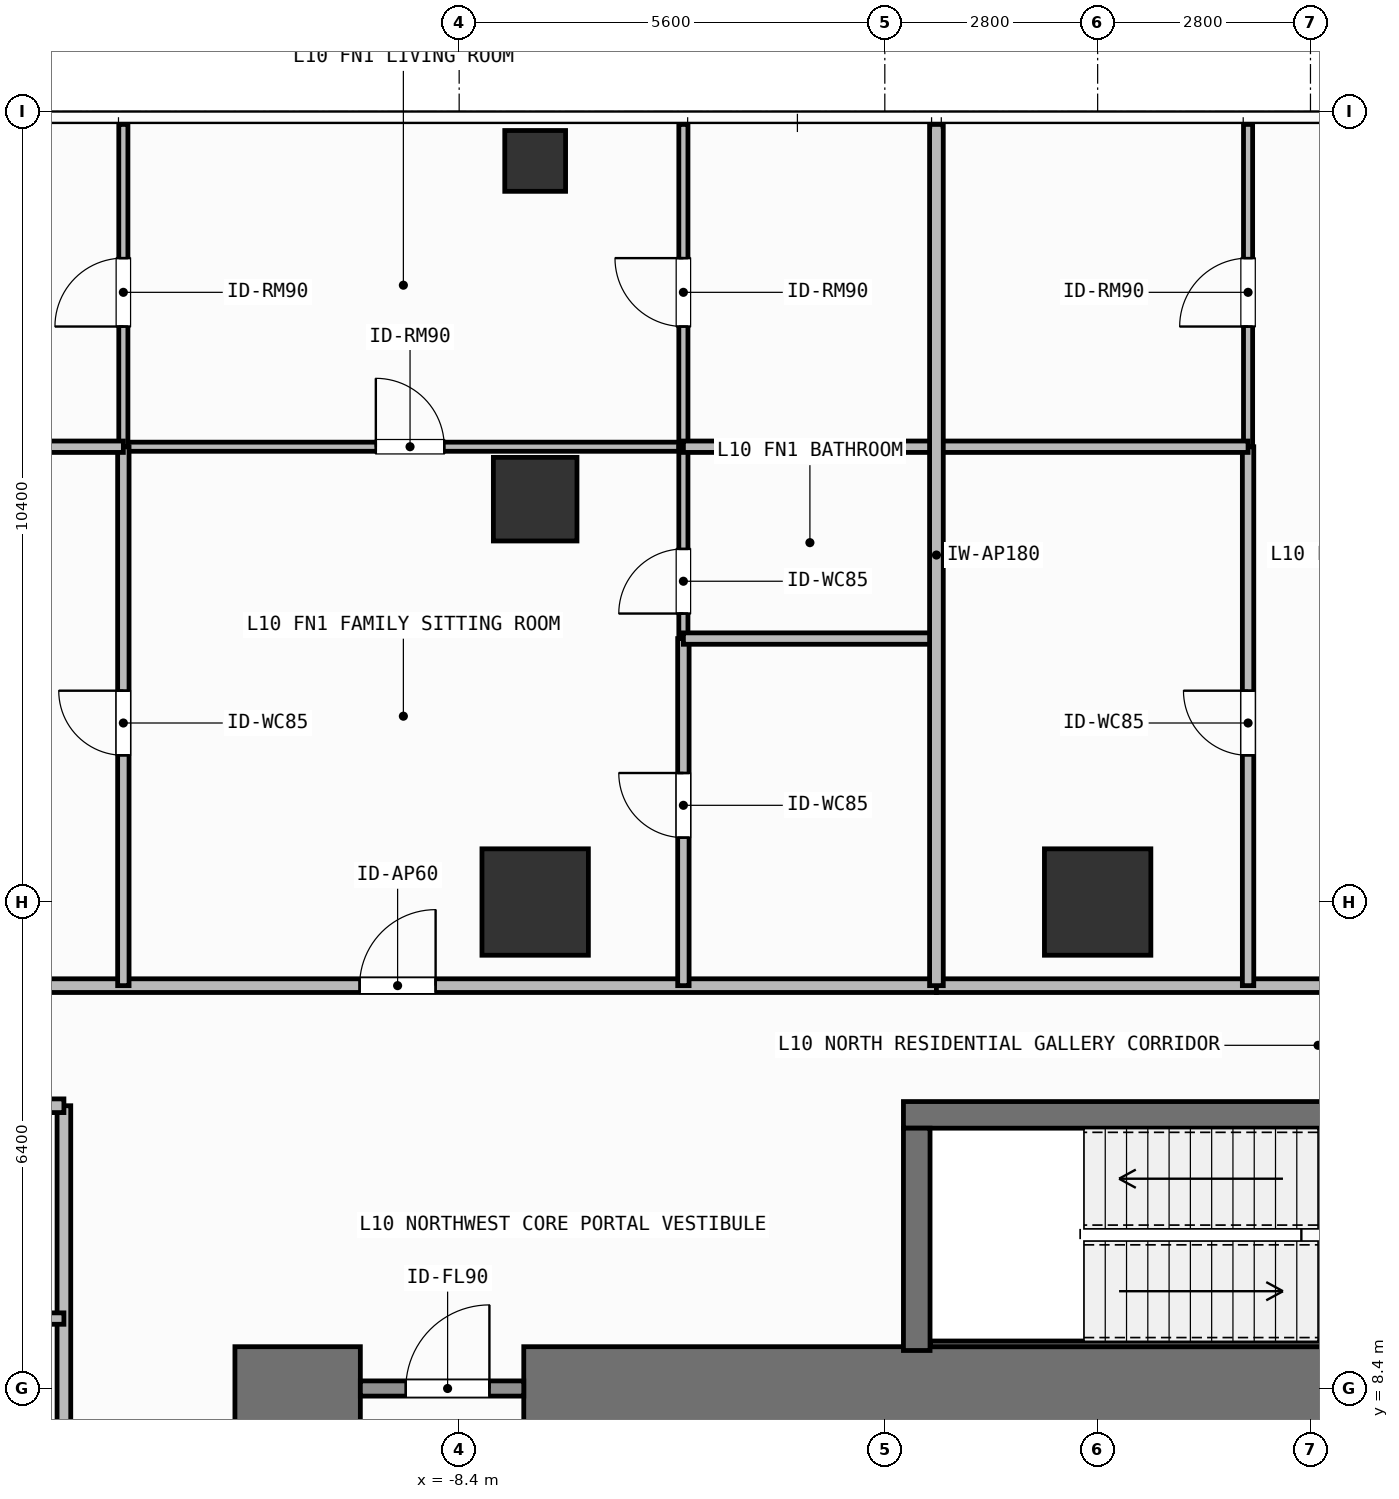
"""IFC4 building model, lengths in metres.
Left out: names, types, materials, properties, quantities, classifications, styles, units other than length and angle.
Written with IfcOpenShell. Run it as: python <this file> out.ifc"""

import sys

from ifc_helpers import new_model, si_unit, direction, frame, frame_2d, origin, origin_2d, place, context, subcontext, project, spatial, rectangle, hollow_rectangle, extrude, element, fill, save


model = new_model("IFC4")
c1 = context("Model", 3, precision=1e-05, world=origin(), true_north=direction((0.0, 1.0)))
c2 = subcontext(c1, "Body", "Model", "MODEL_VIEW")
j1 = project(units=[si_unit("LENGTHUNIT", "METRE"), si_unit("PLANEANGLEUNIT", "RADIAN")], contexts=[c1])
p1 = place(None, origin())
s1 = spatial("IfcSite", under=j1, at=p1, CompositionType="ELEMENT")
p2 = place(p1, origin())
s2 = spatial("IfcBuilding", under=s1, at=p2, CompositionType="ELEMENT")
p3 = place(p2, frame((0.0, 0.0, 38.4)))
s3 = spatial("IfcBuildingStorey", under=s2, at=p3, CompositionType="ELEMENT", Elevation=38.4)
p4 = place(p3, frame((-11.35, 8.4, 0.0), z_axis=(0.0, 0.0, 1.0), x_axis=(1.0, 0.0, 0.0)))
e1 = element("IfcWall", 1, at=p4, inside=s3, PredefinedType="SHEAR", context=c2, shape_type="SweptSolid", body=[
    extrude(rectangle(XDim=1.65, YDim=1.1, at=frame_2d((0.825, 0.0))), origin(), (0.0, 0.0, 1.0), 3.9),
])
p5 = place(p3, frame((-7.55, 8.4, 0.0), z_axis=(0.0, 0.0, 1.0), x_axis=(1.0, 0.0, 0.0)))
e2 = element("IfcWall", 2, at=p5, inside=s3, PredefinedType="SHEAR", context=c2, shape_type="SweptSolid", body=[
    extrude(rectangle(XDim=16.5, YDim=1.1, at=frame_2d((8.25, 0.0))), origin(), (0.0, 0.0, 1.0), 3.9),
])
p6 = place(p3, frame((-2.555, 12.0, 0.0), z_axis=(0.0, 0.0, 1.0), x_axis=(1.0, 0.0, 0.0)))
e3 = element("IfcWall", 3, at=p6, inside=s3, PredefinedType="SHEAR", context=c2, shape_type="SweptSolid", body=[
    extrude(rectangle(XDim=7.31, YDim=0.35, at=frame_2d((3.655, 0.0))), origin(), (0.0, 0.0, 1.0), 3.9),
])
p7 = place(p3, frame((-2.2, 8.988, 0.0), z_axis=(0.0, 0.0, 1.0), x_axis=(1.0, 0.0, 0.0)))
e4 = element("IfcWall", 4, at=p7, inside=s3, PredefinedType="SHEAR", context=c2, shape_type="SweptSolid", body=[
    extrude(rectangle(XDim=6.6, YDim=0.075, at=frame_2d((3.3, 0.0))), origin(), (0.0, 0.0, 1.0), 3.9),
])
p8 = place(p3, frame((-2.38, 8.9, 0.0), z_axis=(0.0, 0.0, 1.0), x_axis=(0.0, 1.0, 0.0)))
e5 = element("IfcWall", 5, at=p8, inside=s3, PredefinedType="SHEAR", context=c2, shape_type="SweptSolid", body=[
    extrude(rectangle(XDim=2.925, YDim=0.35, at=frame_2d((1.462, 0.0))), origin(), (0.0, 0.0, 1.0), 3.9),
])
for number, where, z_axis, x_axis in (
    (6, (-7.4, 14.8, 0.0), (0.0, 0.0, 1.0), (1.0, 0.0, 0.0)),
    (7, (0.0, 14.8, 0.0), (0.0, 0.0, 1.0), (1.0, 0.0, 0.0)),
):
    element("IfcColumn", number, at=place(p3, frame(where, z_axis=z_axis, x_axis=x_axis)), inside=s3, PredefinedType="COLUMN", context=c2, shape_type="SweptSolid", body=[
        extrude(rectangle(XDim=1.4, YDim=1.4, at=origin_2d()), origin(), (0.0, 0.0, 1.0), 3.9),
    ])
p9 = place(p3, frame((-7.4, 20.1, 0.0), z_axis=(0.0, 0.0, 1.0), x_axis=(1.0, 0.0, 0.0)))
e8 = element("IfcColumn", 8, at=p9, inside=s3, PredefinedType="COLUMN", context=c2, shape_type="SweptSolid", body=[
    extrude(rectangle(XDim=1.1, YDim=1.1, at=origin_2d()), origin(), (0.0, 0.0, 1.0), 3.9),
])
p10 = place(p3, frame((-7.4, 24.55, 0.0), z_axis=(0.0, 0.0, 1.0), x_axis=(1.0, 0.0, 0.0)))
e9 = element("IfcColumn", 9, at=p10, inside=s3, PredefinedType="COLUMN", context=c2, shape_type="SweptSolid", body=[
    extrude(hollow_rectangle(XDim=0.8, YDim=0.8, WallThickness=0.036, at=origin_2d()), origin(), (0.0, 0.0, 1.0), 3.9),
])
p11 = place(p3, frame((-9.7, 8.4, 0.0), z_axis=(0.0, 0.0, 1.0), x_axis=(1.0, 0.0, 0.0)))
e10 = element("IfcWall", 10, at=p11, inside=s3, PredefinedType="SOLIDWALL", context=c2, shape_type="SweptSolid", body=[
    extrude(rectangle(XDim=2.15, YDim=0.2, at=frame_2d((1.075, 0.0))), origin(), (0.0, 0.0, 1.0), 2.72),
])
p12 = place(p11, frame((0.598, 0.0, 0.0)))
e11 = element("IfcOpeningElement", 11, at=p12, cuts=e10, PredefinedType="OPENING", context=c2, shape_type="SweptSolid", body=[
    extrude(rectangle(XDim=1.1, YDim=2.15, at=frame_2d((0.55, 1.075))), frame((0.0, 0.11, 0.0), z_axis=(0.0, -1.0, 0.0), x_axis=(1.0, 0.0, 0.0)), (0.0, 0.0, 1.0), 0.22),
])
p13 = place(p3, frame((-18.62, 13.7, 0.0), z_axis=(0.0, 0.0, 1.0), x_axis=(1.0, 0.0, 0.0)))
e12 = element("IfcWall", 12, at=p13, inside=s3, PredefinedType="PARTITIONING", context=c2, shape_type="SweptSolid", body=[
    extrude(rectangle(XDim=16.499, YDim=0.18, at=frame_2d((8.25, 0.0))), origin(), (0.0, 0.0, 1.0), 3.68),
])
p14 = place(p13, frame((8.91, 0.0, 0.0)))
e13 = element("IfcOpeningElement", 13, at=p14, cuts=e12, PredefinedType="OPENING", context=c2, shape_type="SweptSolid", body=[
    extrude(rectangle(XDim=1.0, YDim=2.2, at=frame_2d((0.5, 1.1))), frame((0.0, 0.1, 0.0), z_axis=(0.0, -1.0, 0.0), x_axis=(1.0, 0.0, 0.0)), (0.0, 0.0, 1.0), 0.2),
])
p15 = place(p3, frame((-12.818, 20.79, 0.0), z_axis=(0.0, 0.0, 1.0), x_axis=(1.0, 0.0, 0.0)))
e14 = element("IfcWall", 14, at=p15, inside=s3, PredefinedType="PARTITIONING", context=c2, shape_type="SweptSolid", body=[
    extrude(rectangle(XDim=7.368, YDim=0.12, at=frame_2d((3.684, 0.0))), origin(), (0.0, 0.0, 1.0), 3.68),
])
p16 = place(p15, frame((3.322, 0.0, 0.0)))
e15 = element("IfcOpeningElement", 15, at=p16, cuts=e14, PredefinedType="OPENING", context=c2, shape_type="SweptSolid", body=[
    extrude(rectangle(XDim=0.9, YDim=2.1, at=frame_2d((0.45, 1.05))), frame((0.0, 0.07, 0.0), z_axis=(0.0, -1.0, 0.0), x_axis=(1.0, 0.0, 0.0)), (0.0, 0.0, 1.0), 0.14),
])
p17 = place(p3, frame((-12.818, 13.7, 0.0), z_axis=(0.0, 0.0, 1.0), x_axis=(0.0, 1.0, 0.0)))
e16 = element("IfcWall", 16, at=p17, inside=s3, PredefinedType="PARTITIONING", context=c2, shape_type="SweptSolid", body=[
    extrude(rectangle(XDim=7.09, YDim=0.15, at=frame_2d((3.545, 0.0))), origin(), (0.0, 0.0, 1.0), 3.68),
])
p18 = place(p17, frame((3.03, 0.0, 0.0)))
e17 = element("IfcOpeningElement", 17, at=p18, cuts=e16, PredefinedType="OPENING", context=c2, shape_type="SweptSolid", body=[
    extrude(rectangle(XDim=0.85, YDim=2.1, at=frame_2d((0.425, 1.05))), frame((0.0, 0.085, 0.0), z_axis=(0.0, -1.0, 0.0), x_axis=(1.0, 0.0, 0.0)), (0.0, 0.0, 1.0), 0.17),
])
p19 = place(p3, frame((-12.818, 20.79, 0.0), z_axis=(0.0, 0.0, 1.0), x_axis=(0.0, 1.0, 0.0)))
e18 = element("IfcWall", 18, at=p19, inside=s3, PredefinedType="PARTITIONING", context=c2, shape_type="SweptSolid", body=[
    extrude(rectangle(XDim=4.24, YDim=0.12, at=frame_2d((2.12, 0.0))), origin(), (0.0, 0.0, 1.0), 3.68),
])
p20 = place(p19, frame((1.581, 0.0, 0.0)))
e19 = element("IfcOpeningElement", 19, at=p20, cuts=e18, PredefinedType="OPENING", context=c2, shape_type="SweptSolid", body=[
    extrude(rectangle(XDim=0.9, YDim=2.1, at=frame_2d((0.45, 1.05))), frame((0.0, 0.07, 0.0), z_axis=(0.0, -1.0, 0.0), x_axis=(1.0, 0.0, 0.0)), (0.0, 0.0, 1.0), 0.14),
])
p21 = place(p3, frame((-5.45, 13.7, 0.0), z_axis=(0.0, 0.0, 1.0), x_axis=(0.0, 1.0, 0.0)))
e20 = element("IfcWall", 20, at=p21, inside=s3, PredefinedType="PARTITIONING", context=c2, shape_type="SweptSolid", body=[
    extrude(rectangle(XDim=4.566, YDim=0.15, at=frame_2d((2.283, 0.0))), origin(), (0.0, 0.0, 1.0), 3.68),
])
p22 = place(p21, frame((1.948, 0.0, 0.0)))
e21 = element("IfcOpeningElement", 21, at=p22, cuts=e20, PredefinedType="OPENING", context=c2, shape_type="SweptSolid", body=[
    extrude(rectangle(XDim=0.85, YDim=2.1, at=frame_2d((0.425, 1.05))), frame((0.0, 0.085, 0.0), z_axis=(0.0, -1.0, 0.0), x_axis=(1.0, 0.0, 0.0)), (0.0, 0.0, 1.0), 0.17),
])
p23 = place(p3, frame((-5.45, 18.266, 0.0), z_axis=(0.0, 0.0, 1.0), x_axis=(0.0, 1.0, 0.0)))
e22 = element("IfcWall", 22, at=p23, inside=s3, PredefinedType="PARTITIONING", context=c2, shape_type="SweptSolid", body=[
    extrude(rectangle(XDim=2.524, YDim=0.12, at=frame_2d((1.262, 0.0))), origin(), (0.0, 0.0, 1.0), 3.68),
])
p24 = place(p23, frame((0.329, 0.0, 0.0)))
e23 = element("IfcOpeningElement", 23, at=p24, cuts=e22, PredefinedType="OPENING", context=c2, shape_type="SweptSolid", body=[
    extrude(rectangle(XDim=0.85, YDim=2.1, at=frame_2d((0.425, 1.05))), frame((0.0, 0.07, 0.0), z_axis=(0.0, -1.0, 0.0), x_axis=(1.0, 0.0, 0.0)), (0.0, 0.0, 1.0), 0.14),
])
p25 = place(p3, frame((-5.45, 20.79, 0.0), z_axis=(0.0, 0.0, 1.0), x_axis=(0.0, 1.0, 0.0)))
e24 = element("IfcWall", 24, at=p25, inside=s3, PredefinedType="PARTITIONING", context=c2, shape_type="SweptSolid", body=[
    extrude(rectangle(XDim=4.24, YDim=0.12, at=frame_2d((2.12, 0.0))), origin(), (0.0, 0.0, 1.0), 3.68),
])
p26 = place(p25, frame((1.581, 0.0, 0.0)))
e25 = element("IfcOpeningElement", 25, at=p26, cuts=e24, PredefinedType="OPENING", context=c2, shape_type="SweptSolid", body=[
    extrude(rectangle(XDim=0.9, YDim=2.1, at=frame_2d((0.45, 1.05))), frame((0.0, 0.07, 0.0), z_axis=(0.0, -1.0, 0.0), x_axis=(1.0, 0.0, 0.0)), (0.0, 0.0, 1.0), 0.14),
])
p27 = place(p3, frame((-2.121, 13.7, 0.0), z_axis=(0.0, 0.0, 1.0), x_axis=(1.0, 0.0, 0.0)))
e26 = element("IfcWall", 26, at=p27, inside=s3, PredefinedType="PARTITIONING", context=c2, shape_type="SweptSolid", body=[
    extrude(rectangle(XDim=11.226, YDim=0.18, at=frame_2d((5.613, 0.0))), origin(), (0.0, 0.0, 1.0), 3.68),
])
p28 = place(p27, frame((5.29, 0.0, 0.0)))
e27 = element("IfcOpeningElement", 27, at=p28, cuts=e26, PredefinedType="OPENING", context=c2, shape_type="SweptSolid", body=[
    extrude(rectangle(XDim=1.0, YDim=2.2, at=frame_2d((0.5, 1.1))), frame((0.0, 0.1, 0.0), z_axis=(0.0, -1.0, 0.0), x_axis=(1.0, 0.0, 0.0)), (0.0, 0.0, 1.0), 0.2),
])
p29 = place(p3, frame((1.979, 13.7, 0.0), z_axis=(0.0, 0.0, 1.0), x_axis=(0.0, 1.0, 0.0)))
e28 = element("IfcWall", 28, at=p29, inside=s3, PredefinedType="PARTITIONING", context=c2, shape_type="SweptSolid", body=[
    extrude(rectangle(XDim=7.09, YDim=0.15, at=frame_2d((3.545, 0.0))), origin(), (0.0, 0.0, 1.0), 3.68),
])
p30 = place(p29, frame((3.03, 0.0, 0.0)))
e29 = element("IfcOpeningElement", 29, at=p30, cuts=e28, PredefinedType="OPENING", context=c2, shape_type="SweptSolid", body=[
    extrude(rectangle(XDim=0.85, YDim=2.1, at=frame_2d((0.425, 1.05))), frame((0.0, 0.085, 0.0), z_axis=(0.0, -1.0, 0.0), x_axis=(1.0, 0.0, 0.0)), (0.0, 0.0, 1.0), 0.17),
])
p31 = place(p3, frame((1.979, 20.79, 0.0), z_axis=(0.0, 0.0, 1.0), x_axis=(0.0, 1.0, 0.0)))
e30 = element("IfcWall", 30, at=p31, inside=s3, PredefinedType="PARTITIONING", context=c2, shape_type="SweptSolid", body=[
    extrude(rectangle(XDim=4.24, YDim=0.12, at=frame_2d((2.12, 0.0))), origin(), (0.0, 0.0, 1.0), 3.68),
])
p32 = place(p31, frame((1.581, 0.0, 0.0)))
e31 = element("IfcOpeningElement", 31, at=p32, cuts=e30, PredefinedType="OPENING", context=c2, shape_type="SweptSolid", body=[
    extrude(rectangle(XDim=0.9, YDim=2.1, at=frame_2d((0.45, 1.05))), frame((0.0, 0.07, 0.0), z_axis=(0.0, -1.0, 0.0), x_axis=(1.0, 0.0, 0.0)), (0.0, 0.0, 1.0), 0.14),
])
p33 = place(p3, frame((-13.6, 0.727, 0.0), z_axis=(0.0, 0.0, 1.0), x_axis=(0.0, 1.0, 0.0)))
e32 = element("IfcWall", 32, at=p33, inside=s3, PredefinedType="PARTITIONING", context=c2, shape_type="SweptSolid", body=[
    extrude(rectangle(XDim=11.393, YDim=0.18, at=frame_2d((5.697, 0.0))), origin(), (0.0, 0.0, 1.0), 3.68),
])
p34 = place(p33, frame((4.837, 0.0, 0.0)))
e33 = element("IfcOpeningElement", 33, at=p34, cuts=e32, PredefinedType="OPENING", context=c2, shape_type="SweptSolid", body=[
    extrude(rectangle(XDim=1.0, YDim=2.2, at=frame_2d((0.5, 1.1))), frame((0.0, 0.1, 0.0), z_axis=(0.0, -1.0, 0.0), x_axis=(1.0, 0.0, 0.0)), (0.0, 0.0, 1.0), 0.2),
])
p35 = place(p3, frame((-16.808, 9.32, 0.0), z_axis=(0.0, 0.0, 1.0), x_axis=(1.0, 0.0, 0.0)))
e34 = element("IfcWall", 34, at=p35, inside=s3, PredefinedType="PARTITIONING", context=c2, shape_type="SweptSolid", body=[
    extrude(rectangle(XDim=3.208, YDim=0.15, at=frame_2d((1.604, 0.0))), origin(), (0.0, 0.0, 1.0), 3.68),
])
p36 = place(p35, frame((0.33, 0.0, 0.0)))
e35 = element("IfcOpeningElement", 35, at=p36, cuts=e34, PredefinedType="OPENING", context=c2, shape_type="SweptSolid", body=[
    extrude(rectangle(XDim=0.85, YDim=2.1, at=frame_2d((0.425, 1.05))), frame((0.0, 0.085, 0.0), z_axis=(0.0, -1.0, 0.0), x_axis=(1.0, 0.0, 0.0)), (0.0, 0.0, 1.0), 0.17),
])
p37 = place(p3, frame((-18.62, 20.79, 0.0), z_axis=(0.0, 0.0, 1.0), x_axis=(1.0, 0.0, 0.0)))
e36 = element("IfcWall", 36, at=p37, inside=s3, PredefinedType="PARTITIONING", context=c2, shape_type="SweptSolid", body=[
    extrude(rectangle(XDim=5.802, YDim=0.15, at=frame_2d((2.901, 0.0))), origin(), (0.0, 0.0, 1.0), 3.68),
])
for number, where, z_axis, x_axis in (
    (37, (-5.45, 18.266, 0.0), (0.0, 0.0, 1.0), (1.0, 0.0, 0.0)),
    (38, (-5.45, 20.79, 0.0), (0.0, 0.0, 1.0), (1.0, 0.0, 0.0)),
):
    element("IfcWall", number, at=place(p3, frame(where, z_axis=z_axis, x_axis=x_axis)), inside=s3, PredefinedType="PARTITIONING", context=c2, shape_type="SweptSolid", body=[
        extrude(rectangle(XDim=3.329, YDim=0.15, at=frame_2d((1.665, 0.0))), origin(), (0.0, 0.0, 1.0), 3.68),
    ])
p38 = place(p3, frame((-2.121, 20.79, 0.0), z_axis=(0.0, 0.0, 1.0), x_axis=(1.0, 0.0, 0.0)))
e39 = element("IfcWall", 39, at=p38, inside=s3, PredefinedType="PARTITIONING", context=c2, shape_type="SweptSolid", body=[
    extrude(rectangle(XDim=4.1, YDim=0.15, at=frame_2d((2.05, 0.0))), origin(), (0.0, 0.0, 1.0), 3.68),
])
p39 = place(p3, frame((-2.121, 13.7, 0.0), z_axis=(0.0, 0.0, 1.0), x_axis=(0.0, 1.0, 0.0)))
e40 = element("IfcWall", 40, at=p39, inside=s3, PredefinedType="PARTITIONING", context=c2, shape_type="SweptSolid", body=[
    extrude(rectangle(XDim=11.33, YDim=0.18, at=frame_2d((5.665, 0.0))), origin(), (0.0, 0.0, 1.0), 3.68),
])
p40 = place(p3, frame((-22.13, 12.12, 0.0), z_axis=(0.0, 0.0, 1.0), x_axis=(1.0, 0.0, 0.0)))
e41 = element("IfcWall", 41, at=p40, inside=s3, PredefinedType="PARTITIONING", context=c2, shape_type="SweptSolid", body=[
    extrude(rectangle(XDim=8.53, YDim=0.18, at=frame_2d((4.265, 0.0))), origin(), (0.0, 0.0, 1.0), 3.68),
])
p41 = place(p12, origin())
e42 = element("IfcDoor", 42, at=p41, inside=s3, OperationType="SINGLE_SWING_RIGHT", PredefinedType="DOOR", context=c2, shape_type="SweptSolid", body=[
    extrude(rectangle(XDim=1.1, YDim=2.15, at=frame_2d((0.55, 1.075))), frame((0.0, 0.025, 0.0), z_axis=(0.0, -1.0, 0.0), x_axis=(1.0, 0.0, 0.0)), (0.0, 0.0, 1.0), 0.05),
])
fill(e11, e42)
p42 = place(p14, origin())
e43 = element("IfcDoor", 43, at=p42, inside=s3, OperationType="SINGLE_SWING_RIGHT", PredefinedType="DOOR", context=c2, shape_type="SweptSolid", body=[
    extrude(rectangle(XDim=1.0, YDim=2.2, at=frame_2d((0.5, 1.1))), frame((0.0, 0.025, 0.0), z_axis=(0.0, -1.0, 0.0), x_axis=(1.0, 0.0, 0.0)), (0.0, 0.0, 1.0), 0.05),
])
fill(e13, e43)
p43 = place(p16, origin())
e44 = element("IfcDoor", 44, at=p43, inside=s3, OperationType="SINGLE_SWING_LEFT", PredefinedType="DOOR", context=c2, shape_type="SweptSolid", body=[
    extrude(rectangle(XDim=0.9, YDim=2.1, at=frame_2d((0.45, 1.05))), frame((0.0, 0.025, 0.0), z_axis=(0.0, -1.0, 0.0), x_axis=(1.0, 0.0, 0.0)), (0.0, 0.0, 1.0), 0.05),
])
fill(e15, e44)
p44 = place(p18, origin())
e45 = element("IfcDoor", 45, at=p44, inside=s3, OperationType="SINGLE_SWING_RIGHT", PredefinedType="DOOR", context=c2, shape_type="SweptSolid", body=[
    extrude(rectangle(XDim=0.85, YDim=2.1, at=frame_2d((0.425, 1.05))), frame((0.0, 0.025, 0.0), z_axis=(0.0, -1.0, 0.0), x_axis=(1.0, 0.0, 0.0)), (0.0, 0.0, 1.0), 0.05),
])
fill(e17, e45)
p45 = place(p20, origin())
e46 = element("IfcDoor", 46, at=p45, inside=s3, OperationType="SINGLE_SWING_LEFT", PredefinedType="DOOR", context=c2, shape_type="SweptSolid", body=[
    extrude(rectangle(XDim=0.9, YDim=2.1, at=frame_2d((0.45, 1.05))), frame((0.0, 0.025, 0.0), z_axis=(0.0, -1.0, 0.0), x_axis=(1.0, 0.0, 0.0)), (0.0, 0.0, 1.0), 0.05),
])
fill(e19, e46)
p46 = place(p22, origin())
e47 = element("IfcDoor", 47, at=p46, inside=s3, OperationType="SINGLE_SWING_RIGHT", PredefinedType="DOOR", context=c2, shape_type="SweptSolid", body=[
    extrude(rectangle(XDim=0.85, YDim=2.1, at=frame_2d((0.425, 1.05))), frame((0.0, 0.025, 0.0), z_axis=(0.0, -1.0, 0.0), x_axis=(1.0, 0.0, 0.0)), (0.0, 0.0, 1.0), 0.05),
])
fill(e21, e47)
p47 = place(p24, origin())
e48 = element("IfcDoor", 48, at=p47, inside=s3, OperationType="SINGLE_SWING_LEFT", PredefinedType="DOOR", context=c2, shape_type="SweptSolid", body=[
    extrude(rectangle(XDim=0.85, YDim=2.1, at=frame_2d((0.425, 1.05))), frame((0.0, 0.025, 0.0), z_axis=(0.0, -1.0, 0.0), x_axis=(1.0, 0.0, 0.0)), (0.0, 0.0, 1.0), 0.05),
])
fill(e23, e48)
p48 = place(p26, origin())
e49 = element("IfcDoor", 49, at=p48, inside=s3, OperationType="SINGLE_SWING_RIGHT", PredefinedType="DOOR", context=c2, shape_type="SweptSolid", body=[
    extrude(rectangle(XDim=0.9, YDim=2.1, at=frame_2d((0.45, 1.05))), frame((0.0, 0.025, 0.0), z_axis=(0.0, -1.0, 0.0), x_axis=(1.0, 0.0, 0.0)), (0.0, 0.0, 1.0), 0.05),
])
fill(e25, e49)
p49 = place(p30, origin())
e50 = element("IfcDoor", 50, at=p49, inside=s3, OperationType="SINGLE_SWING_RIGHT", PredefinedType="DOOR", context=c2, shape_type="SweptSolid", body=[
    extrude(rectangle(XDim=0.85, YDim=2.1, at=frame_2d((0.425, 1.05))), frame((0.0, 0.025, 0.0), z_axis=(0.0, -1.0, 0.0), x_axis=(1.0, 0.0, 0.0)), (0.0, 0.0, 1.0), 0.05),
])
fill(e29, e50)
p50 = place(p32, origin())
e51 = element("IfcDoor", 51, at=p50, inside=s3, OperationType="SINGLE_SWING_LEFT", PredefinedType="DOOR", context=c2, shape_type="SweptSolid", body=[
    extrude(rectangle(XDim=0.9, YDim=2.1, at=frame_2d((0.45, 1.05))), frame((0.0, 0.025, 0.0), z_axis=(0.0, -1.0, 0.0), x_axis=(1.0, 0.0, 0.0)), (0.0, 0.0, 1.0), 0.05),
])
fill(e31, e51)
save(model, sys.argv[1])
